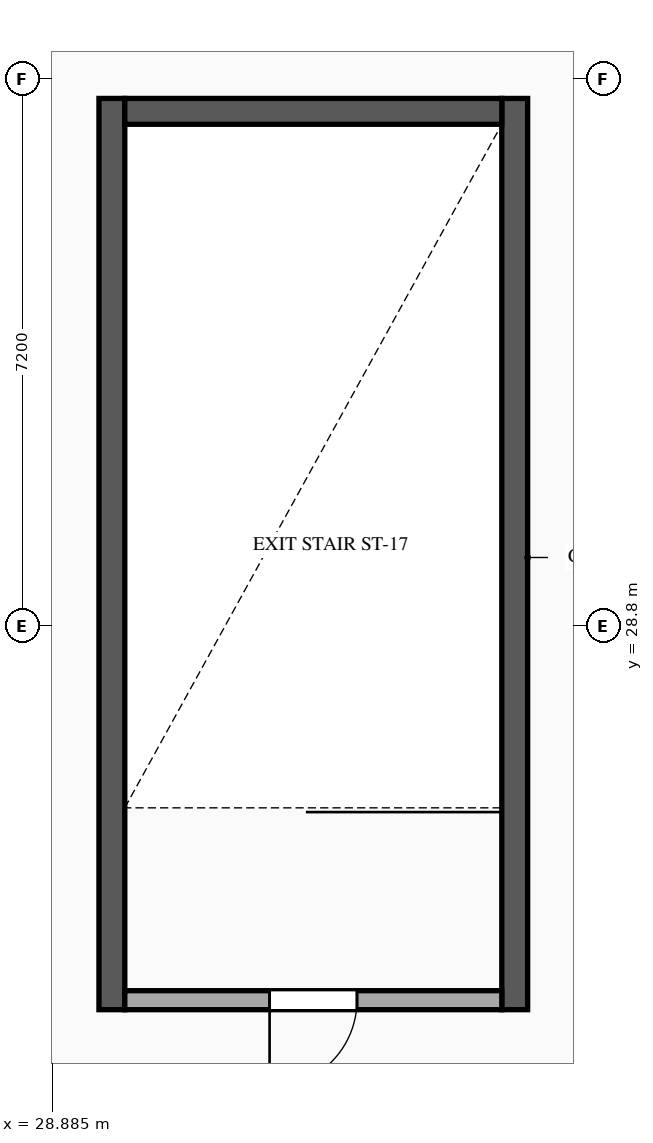
"""IFC4 building model, lengths in metres.
Left out: names, types, materials, properties, quantities, classifications, styles, units other than length and angle.
Written with IfcOpenShell. Run it as: python <this file> out.ifc"""

import sys

from ifc_helpers import new_model, si_unit, direction, frame, frame_2d, origin, place, context, subcontext, project, spatial, rectangle, extrude, element, fill, save


model = new_model("IFC4")
c1 = context("Model", 3, precision=1e-05, world=origin(), true_north=direction((0.0, 1.0)))
c2 = subcontext(c1, "Body", "Model", "MODEL_VIEW")
j1 = project(units=[si_unit("LENGTHUNIT", "METRE"), si_unit("PLANEANGLEUNIT", "RADIAN")], contexts=[c1])
p1 = place(None, origin())
s1 = spatial("IfcSite", under=j1, at=p1, CompositionType="ELEMENT")
p2 = place(p1, origin())
s2 = spatial("IfcBuilding", under=s1, at=p2, CompositionType="ELEMENT")
p3 = place(p2, origin())
s3 = spatial("IfcBuildingStorey", under=s2, at=p3, CompositionType="ELEMENT", Elevation=0.0)
for number, where, z_axis, x_axis in (
    (1, (29.67, 23.75, 0.0), (0.0, 0.0, 1.0), (0.0, 1.0, 0.0)),
    (2, (34.97, 35.74, 0.0), (0.0, 0.0, 1.0), (0.0, -1.0, 0.0)),
):
    element("IfcWall", number, at=place(p3, frame(where, z_axis=z_axis, x_axis=x_axis)), inside=s3, PredefinedType="SHEAR", context=c2, shape_type="SweptSolid", body=[
        extrude(rectangle(XDim=11.99, YDim=0.34, at=frame_2d((5.995, 0.0))), origin(), (0.0, 0.0, 1.0), 5.16),
    ])
p4 = place(p3, frame((29.84, 35.57, 0.0), z_axis=(0.0, 0.0, 1.0), x_axis=(1.0, 0.0, 0.0)))
e3 = element("IfcWall", 3, at=p4, inside=s3, PredefinedType="SHEAR", context=c2, shape_type="SweptSolid", body=[
    extrude(rectangle(XDim=4.96, YDim=0.34, at=frame_2d((2.48, 0.0))), origin(), (0.0, 0.0, 1.0), 5.16),
])
p5 = place(p3, frame((34.8, 23.875, 0.0), z_axis=(0.0, 0.0, 1.0), x_axis=(-1.0, 0.0, 0.0)))
e4 = element("IfcWall", 4, at=p5, inside=s3, PredefinedType="STANDARD", context=c2, shape_type="SweptSolid", body=[
    extrude(rectangle(XDim=4.96, YDim=0.25, at=frame_2d((2.48, 0.0))), origin(), (0.0, 0.0, 1.0), 5.08),
])
p6 = place(p5, frame((1.905, 0.0, 0.0)))
e5 = element("IfcOpeningElement", 5, at=p6, cuts=e4, PredefinedType="OPENING", context=c2, shape_type="SweptSolid", body=[
    extrude(rectangle(XDim=1.15, YDim=2.2, at=frame_2d((0.575, 1.1))), frame((0.0, 0.135, 0.0), z_axis=(0.0, -1.0, 0.0), x_axis=(1.0, 0.0, 0.0)), (0.0, 0.0, 1.0), 0.27),
])
p7 = place(p6, origin())
e6 = element("IfcDoor", 6, at=p7, inside=s3, OperationType="SINGLE_SWING_RIGHT", PredefinedType="DOOR", context=c2, shape_type="SweptSolid", body=[
    extrude(rectangle(XDim=1.15, YDim=2.2, at=frame_2d((0.575, 1.1))), frame((0.0, 0.025, 0.0), z_axis=(0.0, -1.0, 0.0), x_axis=(1.0, 0.0, 0.0)), (0.0, 0.0, 1.0), 0.05),
])
fill(e5, e6)
save(model, sys.argv[1])
